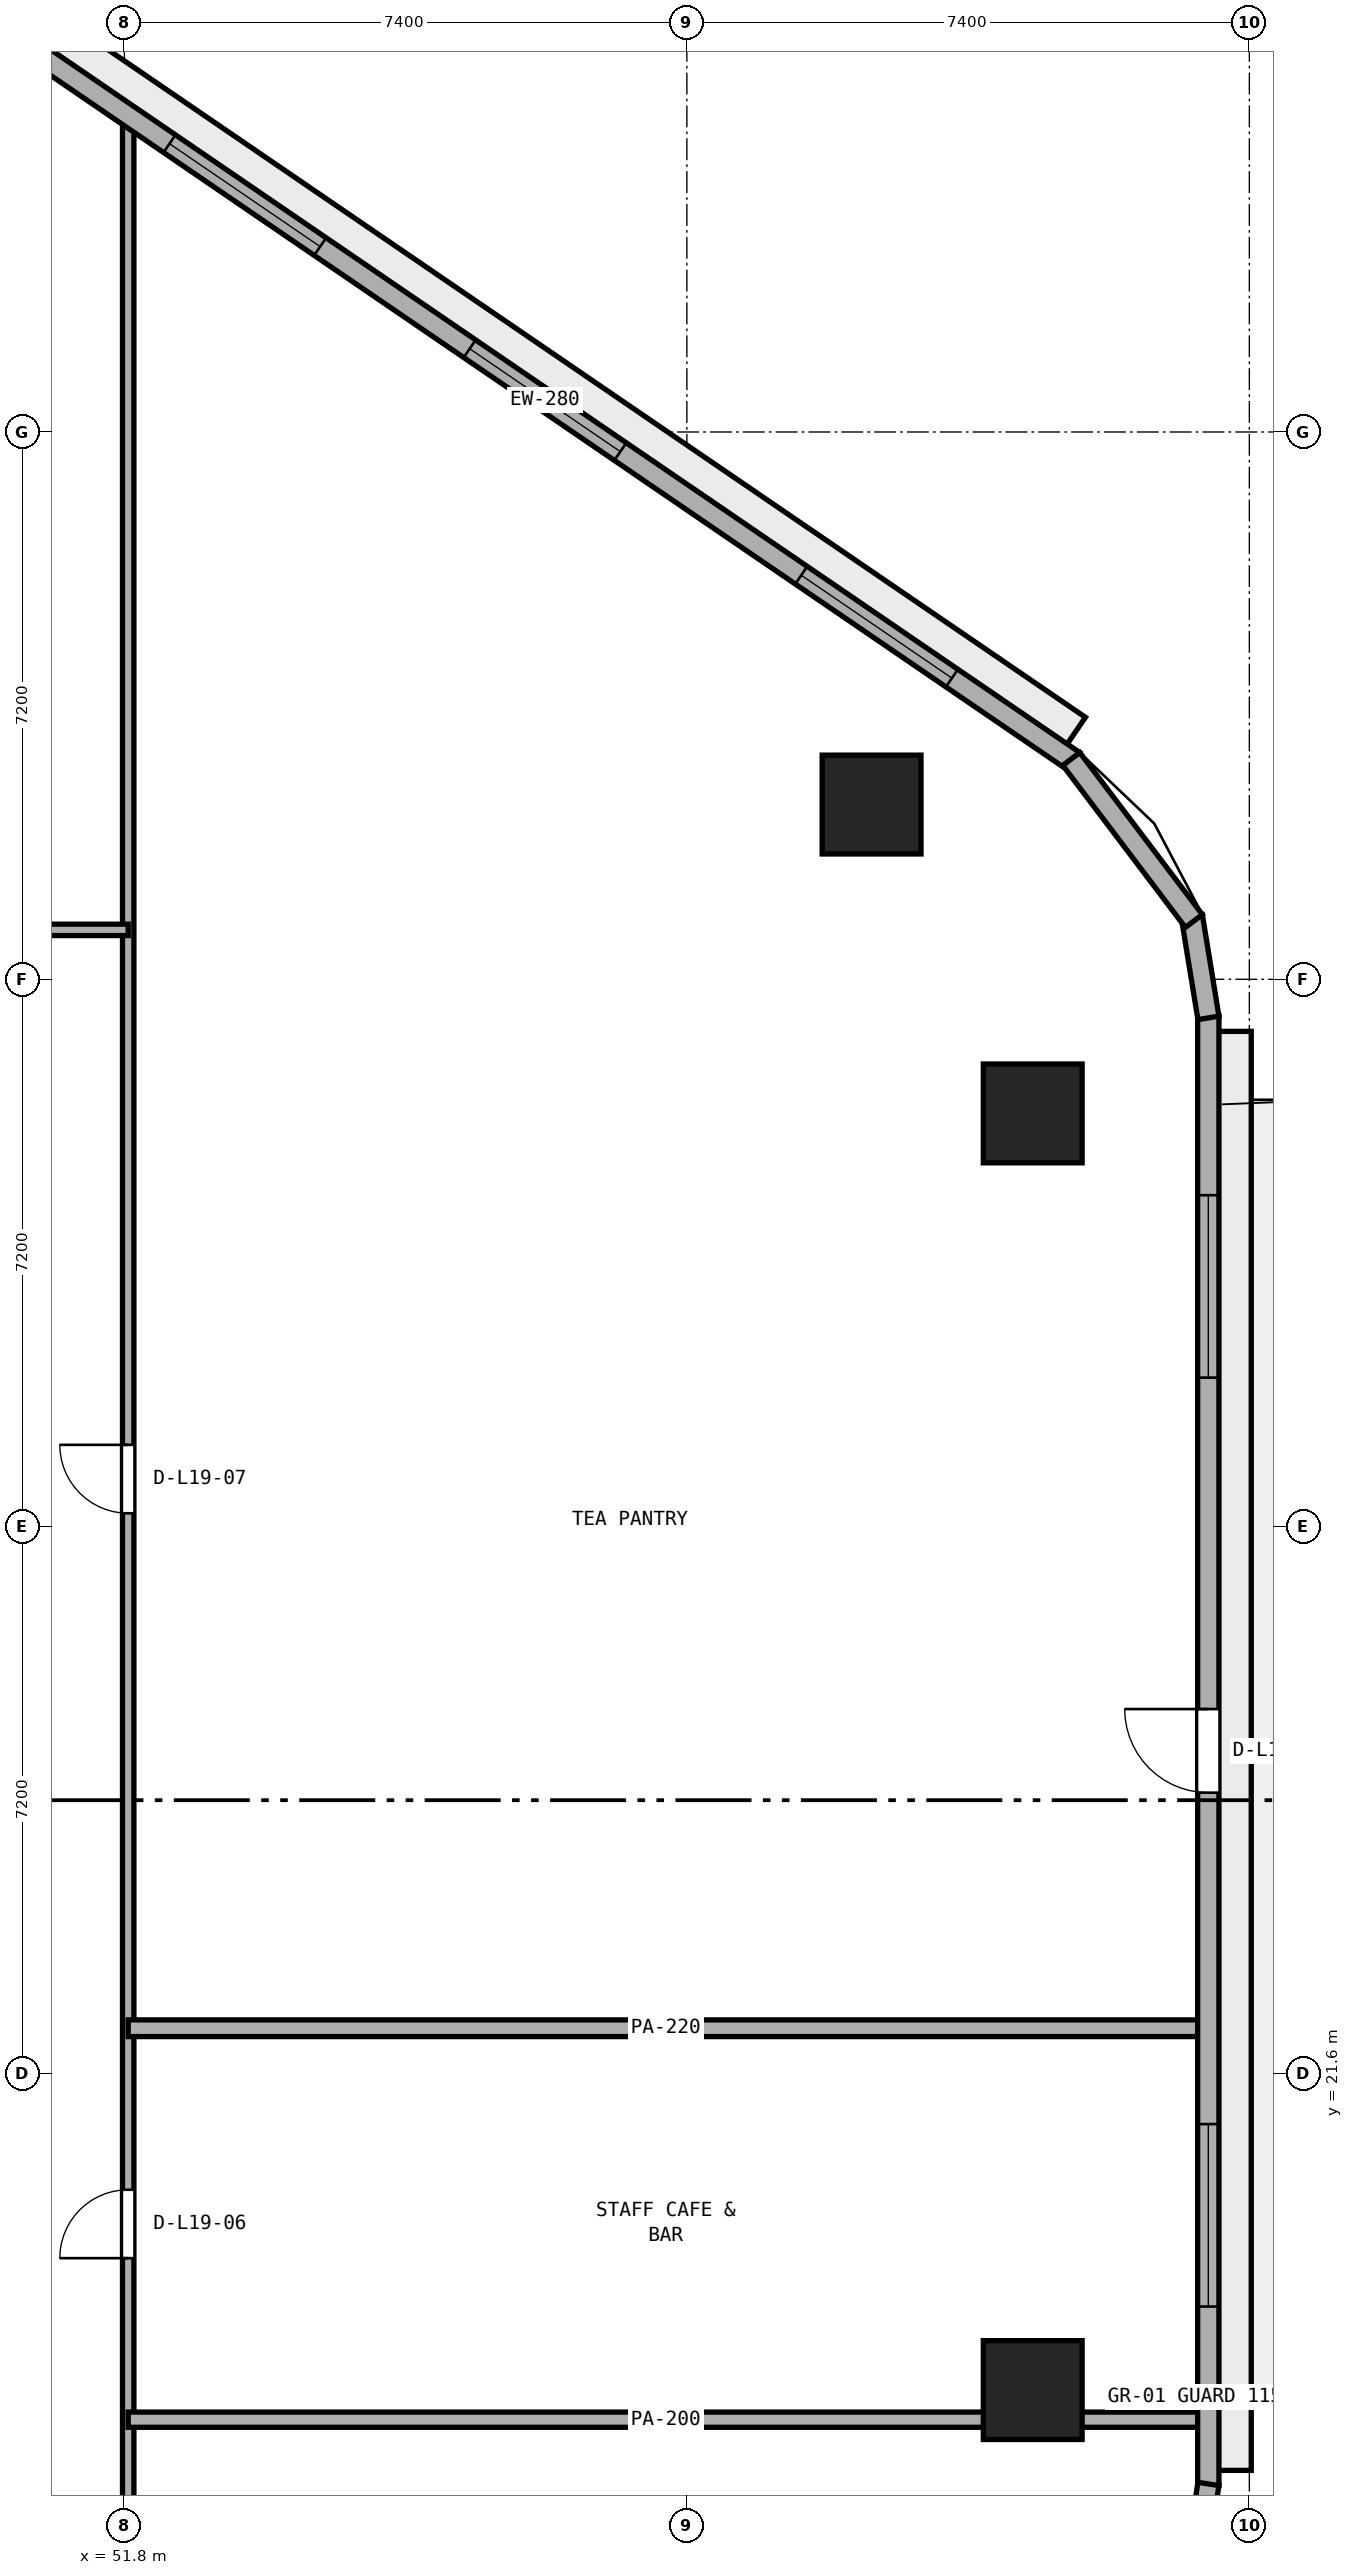
"""IFC4 building model, lengths in metres.
Left out: names, types, materials, properties, quantities, classifications, styles, units other than length and angle.
Written with IfcOpenShell. Run it as: python <this file> out.ifc"""

import sys

from ifc_helpers import new_model, si_unit, direction, frame, frame_2d, origin, origin_2d, place, context, subcontext, project, spatial, rectangle, extrude, element, fill, save


model = new_model("IFC4")
c1 = context("Model", 3, precision=1e-05, world=origin(), true_north=direction((0.0, 1.0)))
c2 = subcontext(c1, "Body", "Model", "MODEL_VIEW")
j1 = project(units=[si_unit("LENGTHUNIT", "METRE"), si_unit("PLANEANGLEUNIT", "RADIAN")], contexts=[c1])
p1 = place(None, origin())
s1 = spatial("IfcSite", under=j1, at=p1, CompositionType="ELEMENT")
p2 = place(p1, origin())
s2 = spatial("IfcBuilding", under=s1, at=p2, CompositionType="ELEMENT")
p3 = place(p2, frame((0.0, 0.0, 78.2)))
s3 = spatial("IfcBuildingStorey", under=s2, at=p3, CompositionType="ELEMENT", Elevation=78.2)
for number, where, z_axis, x_axis in (
    (1, (63.75, 17.44, 0.0), (0.0, 0.0, 1.0), (1.0, 0.0, 0.0)),
    (2, (63.75, 34.235, 0.0), (0.0, 0.0, 1.0), (1.0, 0.0, 0.0)),
    (3, (61.63, 38.299, 0.0), (0.0, 0.0, 1.0), (1.0, 0.0, 0.0)),
):
    element("IfcColumn", number, at=place(p3, frame(where, z_axis=z_axis, x_axis=x_axis)), inside=s3, PredefinedType="COLUMN", context=c2, shape_type="SweptSolid", body=[
        extrude(rectangle(XDim=1.3, YDim=1.3, at=origin_2d()), origin(), (0.0, 0.0, 1.0), 3.8),
    ])
p4 = place(p3, frame((51.85, 13.75, 0.0), z_axis=(0.0, 0.0, 1.0), x_axis=(0.0, 1.0, 0.0)))
e4 = element("IfcWall", 4, at=p4, inside=s3, PredefinedType="PARTITIONING", context=c2, shape_type="SweptSolid", body=[
    extrude(rectangle(XDim=33.644, YDim=0.15, at=frame_2d((16.822, 0.0))), origin(), (0.0, 0.0, 1.0), 3.525),
])
p5 = place(p4, frame((5.425, 0.0, 0.0)))
e5 = element("IfcOpeningElement", 5, at=p5, cuts=e4, PredefinedType="OPENING", context=c2, shape_type="SweptSolid", body=[
    extrude(rectangle(XDim=0.9, YDim=2.1, at=frame_2d((0.45, 1.05))), frame((0.0, 0.085, 0.0), z_axis=(0.0, -1.0, 0.0), x_axis=(1.0, 0.0, 0.0)), (0.0, 0.0, 1.0), 0.17),
])
p6 = place(p4, frame((15.225, 0.0, 0.0)))
e6 = element("IfcOpeningElement", 6, at=p6, cuts=e4, PredefinedType="OPENING", context=c2, shape_type="SweptSolid", body=[
    extrude(rectangle(XDim=0.9, YDim=2.1, at=frame_2d((0.45, 1.05))), frame((0.0, 0.085, 0.0), z_axis=(0.0, -1.0, 0.0), x_axis=(1.0, 0.0, 0.0)), (0.0, 0.0, 1.0), 0.17),
])
p7 = place(p3, frame((51.85, 17.05, 0.0), z_axis=(0.0, 0.0, 1.0), x_axis=(1.0, 0.0, 0.0)))
e7 = element("IfcWall", 7, at=p7, inside=s3, PredefinedType="PARTITIONING", context=c2, shape_type="SweptSolid", body=[
    extrude(rectangle(XDim=14.145, YDim=0.2, at=frame_2d((7.073, 0.0))), origin(), (0.0, 0.0, 1.0), 3.525),
])
p8 = place(p3, frame((51.85, 22.2, 0.0), z_axis=(0.0, 0.0, 1.0), x_axis=(1.0, 0.0, 0.0)))
e8 = element("IfcWall", 8, at=p8, inside=s3, PredefinedType="PARTITIONING", context=c2, shape_type="SweptSolid", body=[
    extrude(rectangle(XDim=14.145, YDim=0.22, at=frame_2d((7.073, 0.0))), origin(), (0.0, 0.0, 1.0), 3.525),
])
p9 = place(p3, frame((22.15, 36.65, 0.0), z_axis=(0.0, 0.0, 1.0), x_axis=(1.0, 0.0, 0.0)))
e9 = element("IfcWall", 9, at=p9, inside=s3, PredefinedType="PARTITIONING", context=c2, shape_type="SweptSolid", body=[
    extrude(rectangle(XDim=29.7, YDim=0.15, at=frame_2d((14.85, 0.0))), origin(), (0.0, 0.0, 1.0), 3.525),
])
p10 = place(p9, frame((4.145, 0.0, 0.0)))
e10 = element("IfcOpeningElement", 10, at=p10, cuts=e9, PredefinedType="OPENING", context=c2, shape_type="SweptSolid", body=[
    extrude(rectangle(XDim=1.0, YDim=2.12, at=frame_2d((0.5, 1.06))), frame((0.0, 0.085, 0.0), z_axis=(0.0, -1.0, 0.0), x_axis=(1.0, 0.0, 0.0)), (0.0, 0.0, 1.0), 0.17),
])
p11 = place(p9, frame((18.755, 0.0, 0.0)))
e11 = element("IfcOpeningElement", 11, at=p11, cuts=e9, PredefinedType="OPENING", context=c2, shape_type="SweptSolid", body=[
    extrude(rectangle(XDim=1.0, YDim=2.12, at=frame_2d((0.5, 1.06))), frame((0.0, 0.085, 0.0), z_axis=(0.0, -1.0, 0.0), x_axis=(1.0, 0.0, 0.0)), (0.0, 0.0, 1.0), 0.17),
])
p12 = place(p3, frame((66.06, 16.183, 0.0), z_axis=(0.0, 0.0, 1.0), x_axis=(0.0, 1.0, 0.0)))
e12 = element("IfcWall", 12, at=p12, inside=s3, PredefinedType="STANDARD", context=c2, shape_type="SweptSolid", body=[
    extrude(rectangle(XDim=19.331, YDim=0.28, at=frame_2d((9.666, 0.0))), origin(), (0.0, 0.0, 1.0), 3.525),
])
p13 = place(p12, frame((9.115, 0.0, 0.0)))
e13 = element("IfcOpeningElement", 13, at=p13, cuts=e12, PredefinedType="OPENING", context=c2, shape_type="SweptSolid", body=[
    extrude(rectangle(XDim=1.1, YDim=2.2, at=frame_2d((0.55, 1.1))), frame((0.0, 0.15, 0.0), z_axis=(0.0, -1.0, 0.0), x_axis=(1.0, 0.0, 0.0)), (0.0, 0.0, 1.0), 0.3),
])
p14 = place(p12, frame((2.355, 0.0, 0.9)))
e14 = element("IfcOpeningElement", 14, at=p14, cuts=e12, PredefinedType="OPENING", context=c2, shape_type="SweptSolid", body=[
    extrude(rectangle(XDim=2.4, YDim=1.75, at=frame_2d((1.2, 0.875))), frame((0.0, 0.15, 0.0), z_axis=(0.0, -1.0, 0.0), x_axis=(1.0, 0.0, 0.0)), (0.0, 0.0, 1.0), 0.3),
])
p15 = place(p12, frame((14.576, 0.0, 0.9)))
e15 = element("IfcOpeningElement", 15, at=p15, cuts=e12, PredefinedType="OPENING", context=c2, shape_type="SweptSolid", body=[
    extrude(rectangle(XDim=2.4, YDim=1.75, at=frame_2d((1.2, 0.875))), frame((0.0, 0.15, 0.0), z_axis=(0.0, -1.0, 0.0), x_axis=(1.0, 0.0, 0.0)), (0.0, 0.0, 1.0), 0.3),
])
p16 = place(p3, frame((64.29, 38.867, 0.0), z_axis=(0.0, 0.0, 1.0), x_axis=(-0.825755550159, 0.564028165416, 0.0)))
e16 = element("IfcWall", 16, at=p16, inside=s3, PredefinedType="STANDARD", context=c2, shape_type="SweptSolid", body=[
    extrude(rectangle(XDim=16.848, YDim=0.28, at=frame_2d((8.424, 0.0))), origin(), (0.0, 0.0, 1.0), 3.525),
])
p17 = place(p16, frame((1.941, 0.0, 0.9)))
e17 = element("IfcOpeningElement", 17, at=p17, cuts=e16, PredefinedType="OPENING", context=c2, shape_type="SweptSolid", body=[
    extrude(rectangle(XDim=2.4, YDim=1.75, at=frame_2d((1.2, 0.875))), frame((0.0, 0.15, 0.0), z_axis=(0.0, -1.0, 0.0), x_axis=(1.0, 0.0, 0.0)), (0.0, 0.0, 1.0), 0.3),
])
p18 = place(p16, frame((7.224, 0.0, 0.9)))
e18 = element("IfcOpeningElement", 18, at=p18, cuts=e16, PredefinedType="OPENING", context=c2, shape_type="SweptSolid", body=[
    extrude(rectangle(XDim=2.4, YDim=1.75, at=frame_2d((1.2, 0.875))), frame((0.0, 0.15, 0.0), z_axis=(0.0, -1.0, 0.0), x_axis=(1.0, 0.0, 0.0)), (0.0, 0.0, 1.0), 0.3),
])
p19 = place(p16, frame((12.007, 0.0, 0.9)))
e19 = element("IfcOpeningElement", 19, at=p19, cuts=e16, PredefinedType="OPENING", context=c2, shape_type="SweptSolid", body=[
    extrude(rectangle(XDim=2.4, YDim=1.75, at=frame_2d((1.2, 0.875))), frame((0.0, 0.15, 0.0), z_axis=(0.0, -1.0, 0.0), x_axis=(1.0, 0.0, 0.0)), (0.0, 0.0, 1.0), 0.3),
])
p20 = place(p3, frame((65.867, 14.943, 0.0), z_axis=(0.0, 0.0, 1.0), x_axis=(0.152014078361, 0.988378328364, 0.0)))
e20 = element("IfcWall", 20, at=p20, inside=s3, PredefinedType="STANDARD", context=c2, shape_type="SweptSolid", body=[
    extrude(rectangle(XDim=1.277, YDim=0.28, at=frame_2d((0.638, 0.0))), origin(), (0.0, 0.0, 1.0), 3.525),
])
p21 = place(p3, frame((66.062, 35.492, 0.0), z_axis=(0.0, 0.0, 1.0), x_axis=(-0.161182073582, 0.986924687682, 0.0)))
e21 = element("IfcWall", 21, at=p21, inside=s3, PredefinedType="STANDARD", context=c2, shape_type="SweptSolid", body=[
    extrude(rectangle(XDim=1.354, YDim=0.28, at=frame_2d((0.677, 0.0))), origin(), (0.0, 0.0, 1.0), 3.525),
])
p22 = place(p3, frame((65.87, 36.767, 0.0), z_axis=(0.0, 0.0, 1.0), x_axis=(-0.603370463754, 0.797461023166, 0.0)))
e22 = element("IfcWall", 22, at=p22, inside=s3, PredefinedType="STANDARD", context=c2, shape_type="SweptSolid", body=[
    extrude(rectangle(XDim=2.673, YDim=0.28, at=frame_2d((1.336, 0.0))), origin(), (0.0, 0.0, 1.0), 3.525),
])
p23 = place(p5, origin())
e23 = element("IfcDoor", 23, at=p23, inside=s3, OperationType="SINGLE_SWING_LEFT", PredefinedType="DOOR", context=c2, shape_type="SweptSolid", body=[
    extrude(rectangle(XDim=0.9, YDim=2.1, at=frame_2d((0.45, 1.05))), frame((0.0, 0.025, 0.0), z_axis=(0.0, -1.0, 0.0), x_axis=(1.0, 0.0, 0.0)), (0.0, 0.0, 1.0), 0.05),
])
fill(e5, e23)
p24 = place(p6, origin())
e24 = element("IfcDoor", 24, at=p24, inside=s3, OperationType="SINGLE_SWING_RIGHT", PredefinedType="DOOR", context=c2, shape_type="SweptSolid", body=[
    extrude(rectangle(XDim=0.9, YDim=2.1, at=frame_2d((0.45, 1.05))), frame((0.0, 0.025, 0.0), z_axis=(0.0, -1.0, 0.0), x_axis=(1.0, 0.0, 0.0)), (0.0, 0.0, 1.0), 0.05),
])
fill(e6, e24)
p25 = place(p13, origin())
e25 = element("IfcDoor", 25, at=p25, inside=s3, OperationType="SINGLE_SWING_RIGHT", PredefinedType="DOOR", context=c2, shape_type="SweptSolid", body=[
    extrude(rectangle(XDim=1.1, YDim=2.2, at=frame_2d((0.55, 1.1))), frame((0.0, 0.025, 0.0), z_axis=(0.0, -1.0, 0.0), x_axis=(1.0, 0.0, 0.0)), (0.0, 0.0, 1.0), 0.05),
])
fill(e13, e25)
p26 = place(p14, origin())
e26 = element("IfcWindow", 26, at=p26, inside=s3, PartitioningType="SINGLE_PANEL", PredefinedType="WINDOW", context=c2, shape_type="SweptSolid", body=[
    extrude(rectangle(XDim=2.4, YDim=1.75, at=frame_2d((1.2, 0.875))), frame((0.0, 0.03, 0.0), z_axis=(0.0, -1.0, 0.0), x_axis=(1.0, 0.0, 0.0)), (0.0, 0.0, 1.0), 0.06),
])
fill(e14, e26)
p27 = place(p15, origin())
e27 = element("IfcWindow", 27, at=p27, inside=s3, PartitioningType="SINGLE_PANEL", PredefinedType="WINDOW", context=c2, shape_type="SweptSolid", body=[
    extrude(rectangle(XDim=2.4, YDim=1.75, at=frame_2d((1.2, 0.875))), frame((0.0, 0.03, 0.0), z_axis=(0.0, -1.0, 0.0), x_axis=(1.0, 0.0, 0.0)), (0.0, 0.0, 1.0), 0.06),
])
fill(e15, e27)
p28 = place(p17, origin())
e28 = element("IfcWindow", 28, at=p28, inside=s3, PartitioningType="SINGLE_PANEL", PredefinedType="WINDOW", context=c2, shape_type="SweptSolid", body=[
    extrude(rectangle(XDim=2.4, YDim=1.75, at=frame_2d((1.2, 0.875))), frame((0.0, 0.03, 0.0), z_axis=(0.0, -1.0, 0.0), x_axis=(1.0, 0.0, 0.0)), (0.0, 0.0, 1.0), 0.06),
])
fill(e17, e28)
p29 = place(p18, origin())
e29 = element("IfcWindow", 29, at=p29, inside=s3, PartitioningType="SINGLE_PANEL", PredefinedType="WINDOW", context=c2, shape_type="SweptSolid", body=[
    extrude(rectangle(XDim=2.4, YDim=1.75, at=frame_2d((1.2, 0.875))), frame((0.0, 0.03, 0.0), z_axis=(0.0, -1.0, 0.0), x_axis=(1.0, 0.0, 0.0)), (0.0, 0.0, 1.0), 0.06),
])
fill(e18, e29)
p30 = place(p19, origin())
e30 = element("IfcWindow", 30, at=p30, inside=s3, PartitioningType="SINGLE_PANEL", PredefinedType="WINDOW", context=c2, shape_type="SweptSolid", body=[
    extrude(rectangle(XDim=2.4, YDim=1.75, at=frame_2d((1.2, 0.875))), frame((0.0, 0.03, 0.0), z_axis=(0.0, -1.0, 0.0), x_axis=(1.0, 0.0, 0.0)), (0.0, 0.0, 1.0), 0.06),
])
fill(e19, e30)
save(model, sys.argv[1])
